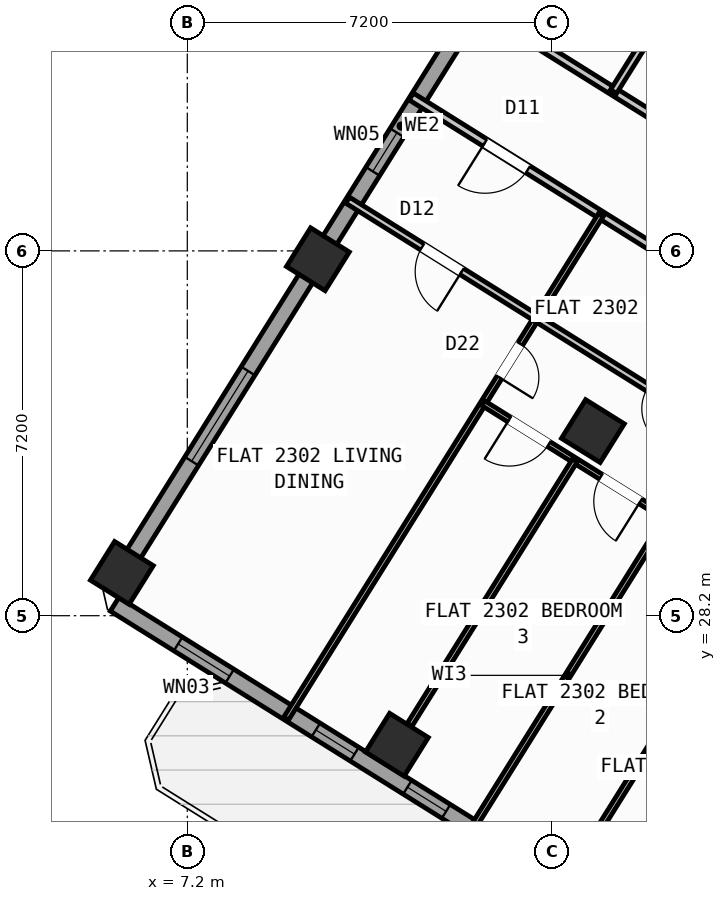
"""IFC4 building model, lengths in metres.
Left out: names, types, materials, properties, quantities, classifications, styles, units other than length and angle.
Written with IfcOpenShell. Run it as: python <this file> out.ifc"""

import sys

from ifc_helpers import new_model, si_unit, direction, frame, frame_2d, origin, origin_2d, place, context, subcontext, project, spatial, rectangle, hollow_rectangle, extrude, source, transform, mapped, element, fill, save


model = new_model("IFC4")
c1 = context("Model", 3, precision=1e-05, world=origin(), true_north=direction((0.0, 1.0)))
c2 = subcontext(c1, "Body", "Model", "MODEL_VIEW")
j1 = project(units=[si_unit("LENGTHUNIT", "METRE"), si_unit("PLANEANGLEUNIT", "RADIAN")], contexts=[c1])
p1 = place(None, origin())
s1 = spatial("IfcSite", under=j1, at=p1, CompositionType="ELEMENT")
p2 = place(p1, origin())
s2 = spatial("IfcBuilding", under=s1, at=p2, CompositionType="ELEMENT")
p3 = place(p2, frame((0.0, 0.0, 93.6)))
s3 = spatial("IfcBuildingStorey", under=s2, at=p3, CompositionType="ELEMENT", Elevation=93.6)
m1 = source(origin(), c2, "Body", "SweptSolid", [
    extrude(hollow_rectangle(XDim=0.9, YDim=0.9, WallThickness=0.036, at=origin_2d()), origin(), (0.0, 0.0, 1.0), 3.6),
])
for number, where, z_axis, x_axis in (
    (1, (15.205, 31.844, 0.0), (0.0, 0.0, 1.0), (-0.848, 0.53, 0.0)),
    (2, (11.336, 25.653, 0.0), (0.0, 0.0, 1.0), (-0.848, 0.53, 0.0)),
    (3, (9.777, 35.235, 0.0), (0.0, 0.0, 1.0), (-0.848, 0.53, 0.0)),
    (4, (5.909, 29.044, 0.0), (0.0, 0.0, 1.0), (-0.848, 0.53, 0.0)),
):
    element("IfcColumn", number, at=place(p3, frame(where, z_axis=z_axis, x_axis=x_axis)), inside=s3, PredefinedType="COLUMN", context=c2, shape_type="MappedRepresentation", body=[
        mapped(m1, transform((0.0, 0.0, 0.0), scale=1.0)),
    ])
p4 = place(p3, frame((31.76, 12.183, 0.0), z_axis=(0.0, 0.0, 1.0), x_axis=(-0.848047074256, 0.529920899612, 0.0)))
e5 = element("IfcWall", 5, at=p4, inside=s3, PredefinedType="STANDARD", context=c2, shape_type="SweptSolid", body=[
    extrude(rectangle(XDim=30.652, YDim=0.32, at=frame_2d((15.326, 0.0))), origin(), (0.0, 0.0, 1.0), 3.35),
])
p5 = place(p4, frame((15.153, 0.0, 0.0)))
e6 = element("IfcOpeningElement", 6, at=p5, cuts=e5, PredefinedType="OPENING", context=c2, shape_type="SweptSolid", body=[
    extrude(rectangle(XDim=1.2, YDim=2.15, at=frame_2d((0.6, 1.075))), frame((0.0, 0.17, 0.0), z_axis=(0.0, -1.0, 0.0), x_axis=(1.0, 0.0, 0.0)), (0.0, 0.0, 1.0), 0.34),
])
p6 = place(p4, frame((2.002, 0.0, 0.8)))
e7 = element("IfcOpeningElement", 7, at=p6, cuts=e5, PredefinedType="OPENING", context=c2, shape_type="SweptSolid", body=[
    extrude(rectangle(XDim=2.1, YDim=1.55, at=frame_2d((1.05, 0.775))), frame((0.0, 0.17, 0.0), z_axis=(0.0, -1.0, 0.0), x_axis=(1.0, 0.0, 0.0)), (0.0, 0.0, 1.0), 0.34),
])
p7 = place(p4, frame((7.206, 0.0, 0.8)))
e8 = element("IfcOpeningElement", 8, at=p7, cuts=e5, PredefinedType="OPENING", context=c2, shape_type="SweptSolid", body=[
    extrude(rectangle(XDim=2.1, YDim=1.55, at=frame_2d((1.05, 0.775))), frame((0.0, 0.17, 0.0), z_axis=(0.0, -1.0, 0.0), x_axis=(1.0, 0.0, 0.0)), (0.0, 0.0, 1.0), 0.34),
])
p8 = place(p4, frame((12.648, 0.0, 1.0)))
e9 = element("IfcOpeningElement", 9, at=p8, cuts=e5, PredefinedType="OPENING", context=c2, shape_type="SweptSolid", body=[
    extrude(rectangle(XDim=0.9, YDim=1.25, at=frame_2d((0.45, 0.625))), frame((0.0, 0.17, 0.0), z_axis=(0.0, -1.0, 0.0), x_axis=(1.0, 0.0, 0.0)), (0.0, 0.0, 1.0), 0.34),
])
p9 = place(p4, frame((27.974, 0.0, 0.95)))
e10 = element("IfcOpeningElement", 10, at=p9, cuts=e5, PredefinedType="OPENING", context=c2, shape_type="SweptSolid", body=[
    extrude(rectangle(XDim=1.2, YDim=1.4, at=frame_2d((0.6, 0.7))), frame((0.0, 0.17, 0.0), z_axis=(0.0, -1.0, 0.0), x_axis=(1.0, 0.0, 0.0)), (0.0, 0.0, 1.0), 0.34),
])
p10 = place(p4, frame((18.347, 0.0, 1.0)))
e11 = element("IfcOpeningElement", 11, at=p10, cuts=e5, PredefinedType="OPENING", context=c2, shape_type="SweptSolid", body=[
    extrude(rectangle(XDim=0.9, YDim=1.25, at=frame_2d((0.45, 0.625))), frame((0.0, 0.17, 0.0), z_axis=(0.0, -1.0, 0.0), x_axis=(1.0, 0.0, 0.0)), (0.0, 0.0, 1.0), 0.34),
])
p11 = place(p4, frame((20.931, 0.0, 1.0)))
e12 = element("IfcOpeningElement", 12, at=p11, cuts=e5, PredefinedType="OPENING", context=c2, shape_type="SweptSolid", body=[
    extrude(rectangle(XDim=0.65, YDim=1.15, at=frame_2d((0.325, 0.575))), frame((0.0, 0.17, 0.0), z_axis=(0.0, -1.0, 0.0), x_axis=(1.0, 0.0, 0.0)), (0.0, 0.0, 1.0), 0.34),
])
p12 = place(p4, frame((22.938, 0.0, 1.0)))
e13 = element("IfcOpeningElement", 13, at=p12, cuts=e5, PredefinedType="OPENING", context=c2, shape_type="SweptSolid", body=[
    extrude(rectangle(XDim=0.9, YDim=1.25, at=frame_2d((0.45, 0.625))), frame((0.0, 0.17, 0.0), z_axis=(0.0, -1.0, 0.0), x_axis=(1.0, 0.0, 0.0)), (0.0, 0.0, 1.0), 0.34),
])
p13 = place(p4, frame((25.069, 0.0, 1.0)))
e14 = element("IfcOpeningElement", 14, at=p13, cuts=e5, PredefinedType="OPENING", context=c2, shape_type="SweptSolid", body=[
    extrude(rectangle(XDim=0.9, YDim=1.25, at=frame_2d((0.45, 0.625))), frame((0.0, 0.17, 0.0), z_axis=(0.0, -1.0, 0.0), x_axis=(1.0, 0.0, 0.0)), (0.0, 0.0, 1.0), 0.34),
])
p14 = place(p3, frame((5.7, 28.71, 0.0), z_axis=(0.0, 0.0, 1.0), x_axis=(0.529923711467, 0.8480453172, 0.0)))
e15 = element("IfcWall", 15, at=p14, inside=s3, PredefinedType="STANDARD", context=c2, shape_type="SweptSolid", body=[
    extrude(rectangle(XDim=21.587, YDim=0.32, at=frame_2d((10.794, 0.0))), origin(), (0.0, 0.0, 1.0), 2.775),
])
p15 = place(p14, frame((2.994, 0.0, 0.8)))
e16 = element("IfcOpeningElement", 16, at=p15, cuts=e15, PredefinedType="OPENING", context=c2, shape_type="SweptSolid", body=[
    extrude(rectangle(XDim=2.1, YDim=1.55, at=frame_2d((1.05, 0.775))), frame((0.0, 0.17, 0.0), z_axis=(0.0, -1.0, 0.0), x_axis=(1.0, 0.0, 0.0)), (0.0, 0.0, 1.0), 0.34),
])
p16 = place(p14, frame((9.739, 0.0, 1.0)))
e17 = element("IfcOpeningElement", 17, at=p16, cuts=e15, PredefinedType="OPENING", context=c2, shape_type="SweptSolid", body=[
    extrude(rectangle(XDim=0.9, YDim=1.25, at=frame_2d((0.45, 0.625))), frame((0.0, 0.17, 0.0), z_axis=(0.0, -1.0, 0.0), x_axis=(1.0, 0.0, 0.0)), (0.0, 0.0, 1.0), 0.34),
])
p17 = place(p14, frame((18.639, 0.0, 0.85)))
e18 = element("IfcOpeningElement", 18, at=p17, cuts=e15, PredefinedType="OPENING", context=c2, shape_type="SweptSolid", body=[
    extrude(rectangle(XDim=1.5, YDim=1.5, at=frame_2d((0.75, 0.75))), frame((0.0, 0.17, 0.0), z_axis=(0.0, -1.0, 0.0), x_axis=(1.0, 0.0, 0.0)), (0.0, 0.0, 1.0), 0.34),
])
p18 = place(p3, frame((26.973, 31.447, 0.0), z_axis=(0.0, 0.0, 1.0), x_axis=(-0.848048310262, 0.529918921593, 0.0)))
e19 = element("IfcWall", 19, at=p18, inside=s3, PredefinedType="PARTITIONING", context=c2, shape_type="SweptSolid", body=[
    extrude(rectangle(XDim=16.73, YDim=0.16, at=frame_2d((8.365, 0.0))), origin(), (0.0, 0.0, 1.0), 3.34),
])
p19 = place(p18, frame((2.22, 0.0, 0.0)))
e20 = element("IfcOpeningElement", 20, at=p19, cuts=e19, PredefinedType="OPENING", context=c2, shape_type="SweptSolid", body=[
    extrude(rectangle(XDim=0.86, YDim=2.05, at=frame_2d((0.43, 1.025))), frame((0.0, 0.09, 0.0), z_axis=(0.0, -1.0, 0.0), x_axis=(1.0, 0.0, 0.0)), (0.0, 0.0, 1.0), 0.18),
])
p20 = place(p18, frame((5.28, 0.0, 0.0)))
e21 = element("IfcOpeningElement", 21, at=p20, cuts=e19, PredefinedType="OPENING", context=c2, shape_type="SweptSolid", body=[
    extrude(rectangle(XDim=1.0, YDim=2.1, at=frame_2d((0.5, 1.05))), frame((0.0, 0.09, 0.0), z_axis=(0.0, -1.0, 0.0), x_axis=(1.0, 0.0, 0.0)), (0.0, 0.0, 1.0), 0.18),
])
p21 = place(p3, frame((25.807, 29.582, 0.0), z_axis=(0.0, 0.0, 1.0), x_axis=(-0.848052408131, 0.529912363569, 0.0)))
e22 = element("IfcWall", 22, at=p21, inside=s3, PredefinedType="PARTITIONING", context=c2, shape_type="SweptSolid", body=[
    extrude(rectangle(XDim=16.73, YDim=0.16, at=frame_2d((8.365, 0.0))), origin(), (0.0, 0.0, 1.0), 3.34),
])
p22 = place(p21, frame((2.22, 0.0, 0.0)))
e23 = element("IfcOpeningElement", 23, at=p22, cuts=e22, PredefinedType="OPENING", context=c2, shape_type="SweptSolid", body=[
    extrude(rectangle(XDim=0.86, YDim=2.05, at=frame_2d((0.43, 1.025))), frame((0.0, 0.09, 0.0), z_axis=(0.0, -1.0, 0.0), x_axis=(1.0, 0.0, 0.0)), (0.0, 0.0, 1.0), 0.18),
])
p23 = place(p21, frame((14.013, 0.0, 0.0)))
e24 = element("IfcOpeningElement", 24, at=p23, cuts=e22, PredefinedType="OPENING", context=c2, shape_type="SweptSolid", body=[
    extrude(rectangle(XDim=1.0, YDim=2.1, at=frame_2d((0.5, 1.05))), frame((0.0, 0.09, 0.0), z_axis=(0.0, -1.0, 0.0), x_axis=(1.0, 0.0, 0.0)), (0.0, 0.0, 1.0), 0.18),
])
p24 = place(p3, frame((15.361, 36.108, 0.0), z_axis=(0.0, 0.0, 1.0), x_axis=(-0.529912802348, -0.848052133956, 0.0)))
e25 = element("IfcWall", 25, at=p24, inside=s3, PredefinedType="PARTITIONING", context=c2, shape_type="SweptSolid", body=[
    extrude(rectangle(XDim=11.72, YDim=0.11, at=frame_2d((5.86, 0.0))), origin(), (0.0, 0.0, 1.0), 2.995),
])
p25 = place(p24, frame((3.0, 0.0, 0.0)))
e26 = element("IfcOpeningElement", 26, at=p25, cuts=e25, PredefinedType="OPENING", context=c2, shape_type="SweptSolid", body=[
    extrude(rectangle(XDim=0.78, YDim=2.05, at=frame_2d((0.39, 1.025))), frame((0.0, 0.065, 0.0), z_axis=(0.0, -1.0, 0.0), x_axis=(1.0, 0.0, 0.0)), (0.0, 0.0, 1.0), 0.13),
])
p26 = place(p3, frame((14.09, 34.073, 0.0), z_axis=(0.0, 0.0, 1.0), x_axis=(-0.848045135007, 0.529924003034, 0.0)))
e27 = element("IfcWall", 27, at=p26, inside=s3, PredefinedType="PLUMBINGWALL", context=c2, shape_type="SweptSolid", body=[
    extrude(rectangle(XDim=4.393, YDim=0.14, at=frame_2d((2.196, 0.0))), origin(), (0.0, 0.0, 1.0), 3.34),
])
p27 = place(p26, frame((1.737, 0.0, 0.0)))
e28 = element("IfcOpeningElement", 28, at=p27, cuts=e27, PredefinedType="OPENING", context=c2, shape_type="SweptSolid", body=[
    extrude(rectangle(XDim=0.92, YDim=2.08, at=frame_2d((0.46, 1.04))), frame((0.0, 0.08, 0.0), z_axis=(0.0, -1.0, 0.0), x_axis=(1.0, 0.0, 0.0)), (0.0, 0.0, 1.0), 0.16),
])
p28 = place(p3, frame((21.321, 29.554, 0.0), z_axis=(0.0, 0.0, 1.0), x_axis=(-0.84803529765, 0.529939745575, 0.0)))
e29 = element("IfcWall", 29, at=p28, inside=s3, PredefinedType="PLUMBINGWALL", context=c2, shape_type="SweptSolid", body=[
    extrude(rectangle(XDim=8.527, YDim=0.14, at=frame_2d((4.264, 0.0))), origin(), (0.0, 0.0, 1.0), 3.34),
])
p29 = place(p28, frame((5.155, 0.0, 0.0)))
e30 = element("IfcOpeningElement", 30, at=p29, cuts=e29, PredefinedType="OPENING", context=c2, shape_type="SweptSolid", body=[
    extrude(rectangle(XDim=0.78, YDim=2.05, at=frame_2d((0.39, 1.025))), frame((0.0, 0.08, 0.0), z_axis=(0.0, -1.0, 0.0), x_axis=(1.0, 0.0, 0.0)), (0.0, 0.0, 1.0), 0.16),
])
p30 = place(p28, frame((1.011, 0.0, 0.0)))
e31 = element("IfcOpeningElement", 31, at=p30, cuts=e29, PredefinedType="OPENING", context=c2, shape_type="SweptSolid", body=[
    extrude(rectangle(XDim=0.78, YDim=2.05, at=frame_2d((0.39, 1.025))), frame((0.0, 0.08, 0.0), z_axis=(0.0, -1.0, 0.0), x_axis=(1.0, 0.0, 0.0)), (0.0, 0.0, 1.0), 0.16),
])
p31 = place(p3, frame((20.272, 27.875, 0.0), z_axis=(0.0, 0.0, 1.0), x_axis=(-0.848056204746, 0.529906287557, 0.0)))
e32 = element("IfcWall", 32, at=p31, inside=s3, PredefinedType="PARTITIONING", context=c2, shape_type="SweptSolid", body=[
    extrude(rectangle(XDim=8.527, YDim=0.11, at=frame_2d((4.264, 0.0))), origin(), (0.0, 0.0, 1.0), 3.34),
])
p32 = place(p31, frame((0.606, 0.0, 0.0)))
e33 = element("IfcOpeningElement", 33, at=p32, cuts=e32, PredefinedType="OPENING", context=c2, shape_type="SweptSolid", body=[
    extrude(rectangle(XDim=0.92, YDim=2.08, at=frame_2d((0.46, 1.04))), frame((0.0, 0.065, 0.0), z_axis=(0.0, -1.0, 0.0), x_axis=(1.0, 0.0, 0.0)), (0.0, 0.0, 1.0), 0.13),
])
p33 = place(p31, frame((2.738, 0.0, 0.0)))
e34 = element("IfcOpeningElement", 34, at=p33, cuts=e32, PredefinedType="OPENING", context=c2, shape_type="SweptSolid", body=[
    extrude(rectangle(XDim=0.92, YDim=2.08, at=frame_2d((0.46, 1.04))), frame((0.0, 0.065, 0.0), z_axis=(0.0, -1.0, 0.0), x_axis=(1.0, 0.0, 0.0)), (0.0, 0.0, 1.0), 0.13),
])
p34 = place(p31, frame((4.869, 0.0, 0.0)))
e35 = element("IfcOpeningElement", 35, at=p34, cuts=e32, PredefinedType="OPENING", context=c2, shape_type="SweptSolid", body=[
    extrude(rectangle(XDim=0.92, YDim=2.08, at=frame_2d((0.46, 1.04))), frame((0.0, 0.065, 0.0), z_axis=(0.0, -1.0, 0.0), x_axis=(1.0, 0.0, 0.0)), (0.0, 0.0, 1.0), 0.13),
])
p35 = place(p31, frame((7.001, 0.0, 0.0)))
e36 = element("IfcOpeningElement", 36, at=p35, cuts=e32, PredefinedType="OPENING", context=c2, shape_type="SweptSolid", body=[
    extrude(rectangle(XDim=0.92, YDim=2.08, at=frame_2d((0.46, 1.04))), frame((0.0, 0.065, 0.0), z_axis=(0.0, -1.0, 0.0), x_axis=(1.0, 0.0, 0.0)), (0.0, 0.0, 1.0), 0.13),
])
for number, where, z_axis, x_axis in (
    (37, (18.464, 29.005, 0.0), (0.0, 0.0, 1.0), (-0.53, -0.848, 0.0)),
    (38, (16.656, 30.135, 0.0), (0.0, 0.0, 1.0), (-0.53, -0.848, 0.0)),
):
    element("IfcWall", number, at=place(p3, frame(where, z_axis=z_axis, x_axis=x_axis)), inside=s3, PredefinedType="PARTITIONING", context=c2, shape_type="SweptSolid", body=[
        extrude(rectangle(XDim=7.34, YDim=0.11, at=frame_2d((3.67, 0.0))), origin(), (0.0, 0.0, 1.0), 2.995),
    ])
p36 = place(p3, frame((14.848, 31.264, 0.0), z_axis=(0.0, 0.0, 1.0), x_axis=(-0.529920534869, -0.848047302174, 0.0)))
e39 = element("IfcWall", 39, at=p36, inside=s3, PredefinedType="PARTITIONING", context=c2, shape_type="SweptSolid", body=[
    extrude(rectangle(XDim=6.158, YDim=0.11, at=frame_2d((3.079, 0.0))), origin(), (0.0, 0.0, 1.0), 2.775),
])
p37 = place(p3, frame((21.655, 37.6, 0.0), z_axis=(0.0, 0.0, 1.0), x_axis=(-0.848044326704, 0.52992529657, 0.0)))
e40 = element("IfcWall", 40, at=p37, inside=s3, PredefinedType="PLUMBINGWALL", context=c2, shape_type="SweptSolid", body=[
    extrude(rectangle(XDim=8.94, YDim=0.14, at=frame_2d((4.47, 0.0))), origin(), (0.0, 0.0, 1.0), 3.34),
])
p38 = place(p37, frame((2.972, 0.0, 0.0)))
e41 = element("IfcOpeningElement", 41, at=p38, cuts=e40, PredefinedType="OPENING", context=c2, shape_type="SweptSolid", body=[
    extrude(rectangle(XDim=0.78, YDim=2.05, at=frame_2d((0.39, 1.025))), frame((0.0, 0.08, 0.0), z_axis=(0.0, -1.0, 0.0), x_axis=(1.0, 0.0, 0.0)), (0.0, 0.0, 1.0), 0.16),
])
p39 = place(p37, frame((6.843, 0.0, 0.0)))
e42 = element("IfcOpeningElement", 42, at=p39, cuts=e40, PredefinedType="OPENING", context=c2, shape_type="SweptSolid", body=[
    extrude(rectangle(XDim=0.78, YDim=2.05, at=frame_2d((0.39, 1.025))), frame((0.0, 0.08, 0.0), z_axis=(0.0, -1.0, 0.0), x_axis=(1.0, 0.0, 0.0)), (0.0, 0.0, 1.0), 0.16),
])
p40 = place(p3, frame((16.89, 40.589, 0.0), z_axis=(0.0, 0.0, 1.0), x_axis=(-0.52988967038, -0.848066587731, 0.0)))
e43 = element("IfcWall", 43, at=p40, inside=s3, PredefinedType="PLUMBINGWALL", context=c2, shape_type="SweptSolid", body=[
    extrude(rectangle(XDim=2.41, YDim=0.14, at=frame_2d((1.205, 0.0))), origin(), (0.0, 0.0, 1.0), 3.34),
])
p41 = place(p3, frame((22.588, 39.093, 0.0), z_axis=(0.0, 0.0, 1.0), x_axis=(-0.848044326704, 0.52992529657, 0.0)))
e44 = element("IfcWall", 44, at=p41, inside=s3, PredefinedType="PARTITIONING", context=c2, shape_type="SweptSolid", body=[
    extrude(rectangle(XDim=8.94, YDim=0.11, at=frame_2d((4.47, 0.0))), origin(), (0.0, 0.0, 1.0), 3.34),
])
p42 = place(p41, frame((1.03, 0.0, 0.0)))
e45 = element("IfcOpeningElement", 45, at=p42, cuts=e44, PredefinedType="OPENING", context=c2, shape_type="SweptSolid", body=[
    extrude(rectangle(XDim=0.92, YDim=2.08, at=frame_2d((0.46, 1.04))), frame((0.0, 0.065, 0.0), z_axis=(0.0, -1.0, 0.0), x_axis=(1.0, 0.0, 0.0)), (0.0, 0.0, 1.0), 0.13),
])
p43 = place(p41, frame((4.01, 0.0, 0.0)))
e46 = element("IfcOpeningElement", 46, at=p43, cuts=e44, PredefinedType="OPENING", context=c2, shape_type="SweptSolid", body=[
    extrude(rectangle(XDim=0.92, YDim=2.08, at=frame_2d((0.46, 1.04))), frame((0.0, 0.065, 0.0), z_axis=(0.0, -1.0, 0.0), x_axis=(1.0, 0.0, 0.0)), (0.0, 0.0, 1.0), 0.13),
])
p44 = place(p41, frame((6.99, 0.0, 0.0)))
e47 = element("IfcOpeningElement", 47, at=p44, cuts=e44, PredefinedType="OPENING", context=c2, shape_type="SweptSolid", body=[
    extrude(rectangle(XDim=0.92, YDim=2.08, at=frame_2d((0.46, 1.04))), frame((0.0, 0.065, 0.0), z_axis=(0.0, -1.0, 0.0), x_axis=(1.0, 0.0, 0.0)), (0.0, 0.0, 1.0), 0.13),
])
m2 = source(origin(), c2, "Body", "SweptSolid", [
    extrude(rectangle(XDim=1.2, YDim=1.4, at=frame_2d((0.6, 0.7))), frame((0.0, 0.03, 0.0), z_axis=(0.0, -1.0, 0.0), x_axis=(1.0, 0.0, 0.0)), (0.0, 0.0, 1.0), 0.06),
])
p45 = place(p9, origin())
e48 = element("IfcWindow", 48, at=p45, inside=s3, PartitioningType="SINGLE_PANEL", PredefinedType="WINDOW", context=c2, shape_type="MappedRepresentation", body=[
    mapped(m2, transform((0.0, 0.0, 0.0), scale=1.0)),
])
fill(e10, e48)
m3 = source(origin(), c2, "Body", "SweptSolid", [
    extrude(rectangle(XDim=2.1, YDim=1.55, at=frame_2d((1.05, 0.775))), frame((0.0, 0.03, 0.0), z_axis=(0.0, -1.0, 0.0), x_axis=(1.0, 0.0, 0.0)), (0.0, 0.0, 1.0), 0.06),
])
p46 = place(p15, origin())
e49 = element("IfcWindow", 49, at=p46, inside=s3, PartitioningType="SINGLE_PANEL", PredefinedType="WINDOW", context=c2, shape_type="MappedRepresentation", body=[
    mapped(m3, transform((0.0, 0.0, 0.0), scale=1.0)),
])
fill(e16, e49)
m4 = source(origin(), c2, "Body", "SweptSolid", [
    extrude(rectangle(XDim=0.9, YDim=1.25, at=frame_2d((0.45, 0.625))), frame((0.0, 0.03, 0.0), z_axis=(0.0, -1.0, 0.0), x_axis=(1.0, 0.0, 0.0)), (0.0, 0.0, 1.0), 0.06),
])
p47 = place(p16, origin())
e50 = element("IfcWindow", 50, at=p47, inside=s3, PartitioningType="SINGLE_PANEL", PredefinedType="WINDOW", context=c2, shape_type="MappedRepresentation", body=[
    mapped(m4, transform((0.0, 0.0, 0.0), scale=1.0)),
])
fill(e17, e50)
p48 = place(p12, origin())
e51 = element("IfcWindow", 51, at=p48, inside=s3, PartitioningType="SINGLE_PANEL", PredefinedType="WINDOW", context=c2, shape_type="MappedRepresentation", body=[
    mapped(m4, transform((0.0, 0.0, 0.0), scale=1.0)),
])
fill(e13, e51)
p49 = place(p13, origin())
e52 = element("IfcWindow", 52, at=p49, inside=s3, PartitioningType="SINGLE_PANEL", PredefinedType="WINDOW", context=c2, shape_type="MappedRepresentation", body=[
    mapped(m4, transform((0.0, 0.0, 0.0), scale=1.0)),
])
fill(e14, e52)
m5 = source(origin(), c2, "Body", "SweptSolid", [
    extrude(rectangle(XDim=1.0, YDim=2.1, at=frame_2d((0.5, 1.05))), frame((0.0, 0.025, 0.0), z_axis=(0.0, -1.0, 0.0), x_axis=(1.0, 0.0, 0.0)), (0.0, 0.0, 1.0), 0.05),
])
p50 = place(p23, origin())
e53 = element("IfcDoor", 53, at=p50, inside=s3, OperationType="SINGLE_SWING_RIGHT", PredefinedType="DOOR", context=c2, shape_type="MappedRepresentation", body=[
    mapped(m5, transform((0.0, 0.0, 0.0), scale=1.0)),
])
fill(e24, e53)
m6 = source(origin(), c2, "Body", "SweptSolid", [
    extrude(rectangle(XDim=0.92, YDim=2.08, at=frame_2d((0.46, 1.04))), frame((0.0, 0.025, 0.0), z_axis=(0.0, -1.0, 0.0), x_axis=(1.0, 0.0, 0.0)), (0.0, 0.0, 1.0), 0.05),
])
p51 = place(p27, origin())
e54 = element("IfcDoor", 54, at=p51, inside=s3, OperationType="SINGLE_SWING_LEFT", PredefinedType="DOOR", context=c2, shape_type="MappedRepresentation", body=[
    mapped(m6, transform((0.0, 0.0, 0.0), scale=1.0)),
])
fill(e28, e54)
m7 = source(origin(), c2, "Body", "SweptSolid", [
    extrude(rectangle(XDim=0.78, YDim=2.05, at=frame_2d((0.39, 1.025))), frame((0.0, 0.025, 0.0), z_axis=(0.0, -1.0, 0.0), x_axis=(1.0, 0.0, 0.0)), (0.0, 0.0, 1.0), 0.05),
])
p52 = place(p25, origin())
e55 = element("IfcDoor", 55, at=p52, inside=s3, OperationType="SINGLE_SWING_RIGHT", PredefinedType="DOOR", context=c2, shape_type="MappedRepresentation", body=[
    mapped(m7, transform((0.0, 0.0, 0.0), scale=1.0)),
])
fill(e26, e55)
p53 = place(p34, origin())
e56 = element("IfcDoor", 56, at=p53, inside=s3, OperationType="SINGLE_SWING_LEFT", PredefinedType="DOOR", context=c2, shape_type="MappedRepresentation", body=[
    mapped(m6, transform((0.0, 0.0, 0.0), scale=1.0)),
])
fill(e35, e56)
p54 = place(p35, origin())
e57 = element("IfcDoor", 57, at=p54, inside=s3, OperationType="SINGLE_SWING_RIGHT", PredefinedType="DOOR", context=c2, shape_type="MappedRepresentation", body=[
    mapped(m6, transform((0.0, 0.0, 0.0), scale=1.0)),
])
fill(e36, e57)
save(model, sys.argv[1])
